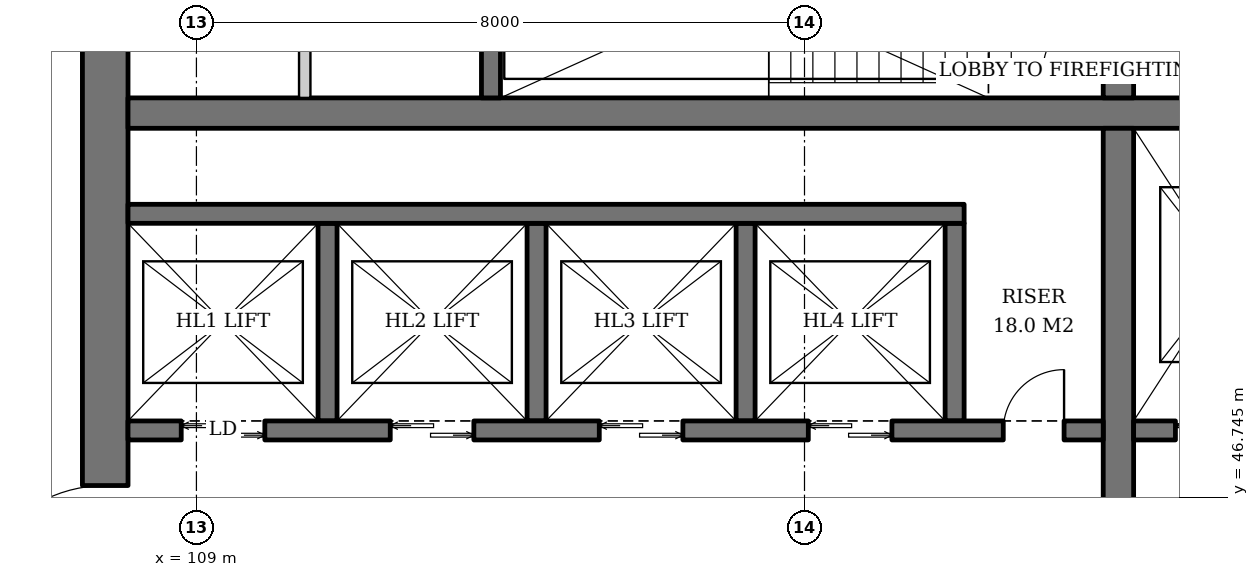
"""IFC4 building model, lengths in metres.
Left out: names, types, materials, properties, quantities, classifications, styles, units other than length and angle.
Written with IfcOpenShell. Run it as: python <this file> out.ifc"""

import sys

from ifc_helpers import new_model, si_unit, direction, frame, frame_2d, origin, place, context, subcontext, project, spatial, rectangle, extrude, element, fill, save


model = new_model("IFC4")
c1 = context("Model", 3, precision=1e-05, world=origin(), true_north=direction((0.0, 1.0)))
c2 = subcontext(c1, "Body", "Model", "MODEL_VIEW")
j1 = project(units=[si_unit("LENGTHUNIT", "METRE"), si_unit("PLANEANGLEUNIT", "RADIAN")], contexts=[c1])
p1 = place(None, origin())
s1 = spatial("IfcSite", under=j1, at=p1, CompositionType="ELEMENT")
p2 = place(p1, origin())
s2 = spatial("IfcBuilding", under=s1, at=p2, CompositionType="ELEMENT")
p3 = place(p2, frame((0.0, 0.0, 100.8)))
s3 = spatial("IfcBuildingStorey", under=s2, at=p3, CompositionType="ELEMENT", Elevation=100.8)
p4 = place(p3, frame((107.8, 37.1, 0.0), z_axis=(0.0, 0.0, 1.0), x_axis=(0.0, 1.0, 0.0)))
e1 = element("IfcWall", 1, at=p4, inside=s3, PredefinedType="SHEAR", context=c2, shape_type="SweptSolid", body=[
    extrude(rectangle(XDim=17.8, YDim=0.6, at=frame_2d((8.9, 0.0))), origin(), (0.0, 0.0, 1.0), 3.8),
])
p5 = place(p4, frame((8.0, 0.0, 0.0)))
e2 = element("IfcOpeningElement", 2, at=p5, cuts=e1, PredefinedType="OPENING", context=c2, shape_type="SweptSolid", body=[
    extrude(rectangle(XDim=1.8, YDim=2.4, at=frame_2d((0.9, 1.2))), frame((0.0, 0.31, 0.0), z_axis=(0.0, -1.0, 0.0), x_axis=(1.0, 0.0, 0.0)), (0.0, 0.0, 1.0), 0.62),
])
p6 = place(p3, frame((108.1, 51.8, 0.0), z_axis=(0.0, 0.0, 1.0), x_axis=(1.0, 0.0, 0.0)))
e3 = element("IfcWall", 3, at=p6, inside=s3, PredefinedType="SHEAR", context=c2, shape_type="SweptSolid", body=[
    extrude(rectangle(XDim=17.8, YDim=0.4, at=frame_2d((8.9, 0.0))), origin(), (0.0, 0.0, 1.0), 3.8),
])
p7 = place(p3, frame((121.13, 40.4, 0.0), z_axis=(0.0, 0.0, 1.0), x_axis=(0.0, 1.0, 0.0)))
e4 = element("IfcWall", 4, at=p7, inside=s3, PredefinedType="SHEAR", context=c2, shape_type="SweptSolid", body=[
    extrude(rectangle(XDim=11.2, YDim=0.4, at=frame_2d((5.6, 0.0))), origin(), (0.0, 0.0, 1.0), 3.8),
])
p8 = place(p3, frame((121.13, 52.0, 0.0), z_axis=(0.0, 0.0, 1.0), x_axis=(0.0, 1.0, 0.0)))
e5 = element("IfcWall", 5, at=p8, inside=s3, PredefinedType="SHEAR", context=c2, shape_type="SweptSolid", body=[
    extrude(rectangle(XDim=2.9, YDim=0.4, at=frame_2d((1.45, 0.0))), origin(), (0.0, 0.0, 1.0), 3.8),
])
p9 = place(p8, frame((0.3, 0.0, 0.0)))
e6 = element("IfcOpeningElement", 6, at=p9, cuts=e5, PredefinedType="OPENING", context=c2, shape_type="SweptSolid", body=[
    extrude(rectangle(XDim=1.0, YDim=2.1, at=frame_2d((0.5, 1.05))), frame((0.0, 0.21, 0.0), z_axis=(0.0, -1.0, 0.0), x_axis=(1.0, 0.0, 0.0)), (0.0, 0.0, 1.0), 0.42),
])
p10 = place(p3, frame((112.875, 52.0, 0.0), z_axis=(0.0, 0.0, 1.0), x_axis=(0.0, 1.0, 0.0)))
e7 = element("IfcWall", 7, at=p10, inside=s3, PredefinedType="SHEAR", context=c2, shape_type="SweptSolid", body=[
    extrude(rectangle(XDim=2.9, YDim=0.25, at=frame_2d((1.45, 0.0))), origin(), (0.0, 0.0, 1.0), 3.8),
])
for number, where, z_axis, x_axis in (
    (8, (110.725, 47.75, 0.0), (0.0, 0.0, 1.0), (0.0, 1.0, 0.0)),
    (9, (113.475, 47.75, 0.0), (0.0, 0.0, 1.0), (0.0, 1.0, 0.0)),
    (10, (116.225, 47.75, 0.0), (0.0, 0.0, 1.0), (0.0, 1.0, 0.0)),
    (11, (118.975, 47.75, 0.0), (0.0, 0.0, 1.0), (0.0, 1.0, 0.0)),
):
    element("IfcWall", number, at=place(p3, frame(where, z_axis=z_axis, x_axis=x_axis)), inside=s3, PredefinedType="SHEAR", context=c2, shape_type="SweptSolid", body=[
        extrude(rectangle(XDim=2.6, YDim=0.25, at=frame_2d((1.3, 0.0))), origin(), (0.0, 0.0, 1.0), 3.8),
    ])
p11 = place(p3, frame((108.1, 50.475, 0.0), z_axis=(0.0, 0.0, 1.0), x_axis=(1.0, 0.0, 0.0)))
e12 = element("IfcWall", 12, at=p11, inside=s3, PredefinedType="SHEAR", context=c2, shape_type="SweptSolid", body=[
    extrude(rectangle(XDim=11.0, YDim=0.25, at=frame_2d((5.5, 0.0))), origin(), (0.0, 0.0, 1.0), 3.8),
])
p12 = place(p3, frame((108.1, 47.625, 0.0), z_axis=(0.0, 0.0, 1.0), x_axis=(1.0, 0.0, 0.0)))
e13 = element("IfcWall", 13, at=p12, inside=s3, PredefinedType="SHEAR", context=c2, shape_type="SweptSolid", body=[
    extrude(rectangle(XDim=12.83, YDim=0.25, at=frame_2d((6.415, 0.0))), origin(), (0.0, 0.0, 1.0), 3.8),
])
p13 = place(p12, frame((0.7, 0.0, 0.0)))
e14 = element("IfcOpeningElement", 14, at=p13, cuts=e13, PredefinedType="OPENING", context=c2, shape_type="SweptSolid", body=[
    extrude(rectangle(XDim=1.1, YDim=2.2, at=frame_2d((0.55, 1.1))), frame((0.0, 0.135, 0.0), z_axis=(0.0, -1.0, 0.0), x_axis=(1.0, 0.0, 0.0)), (0.0, 0.0, 1.0), 0.27),
])
p14 = place(p12, frame((3.45, 0.0, 0.0)))
e15 = element("IfcOpeningElement", 15, at=p14, cuts=e13, PredefinedType="OPENING", context=c2, shape_type="SweptSolid", body=[
    extrude(rectangle(XDim=1.1, YDim=2.2, at=frame_2d((0.55, 1.1))), frame((0.0, 0.135, 0.0), z_axis=(0.0, -1.0, 0.0), x_axis=(1.0, 0.0, 0.0)), (0.0, 0.0, 1.0), 0.27),
])
p15 = place(p12, frame((6.2, 0.0, 0.0)))
e16 = element("IfcOpeningElement", 16, at=p15, cuts=e13, PredefinedType="OPENING", context=c2, shape_type="SweptSolid", body=[
    extrude(rectangle(XDim=1.1, YDim=2.2, at=frame_2d((0.55, 1.1))), frame((0.0, 0.135, 0.0), z_axis=(0.0, -1.0, 0.0), x_axis=(1.0, 0.0, 0.0)), (0.0, 0.0, 1.0), 0.27),
])
p16 = place(p12, frame((8.95, 0.0, 0.0)))
e17 = element("IfcOpeningElement", 17, at=p16, cuts=e13, PredefinedType="OPENING", context=c2, shape_type="SweptSolid", body=[
    extrude(rectangle(XDim=1.1, YDim=2.2, at=frame_2d((0.55, 1.1))), frame((0.0, 0.135, 0.0), z_axis=(0.0, -1.0, 0.0), x_axis=(1.0, 0.0, 0.0)), (0.0, 0.0, 1.0), 0.27),
])
p17 = place(p12, frame((11.515, 0.0, 0.0)))
e18 = element("IfcOpeningElement", 18, at=p17, cuts=e13, PredefinedType="OPENING", context=c2, shape_type="SweptSolid", body=[
    extrude(rectangle(XDim=0.8, YDim=2.0, at=frame_2d((0.4, 1.0))), frame((0.0, 0.135, 0.0), z_axis=(0.0, -1.0, 0.0), x_axis=(1.0, 0.0, 0.0)), (0.0, 0.0, 1.0), 0.27),
])
p18 = place(p3, frame((121.33, 47.625, 0.0), z_axis=(0.0, 0.0, 1.0), x_axis=(1.0, 0.0, 0.0)))
e19 = element("IfcWall", 19, at=p18, inside=s3, PredefinedType="SHEAR", context=c2, shape_type="SweptSolid", body=[
    extrude(rectangle(XDim=4.57, YDim=0.25, at=frame_2d((2.285, 0.0))), origin(), (0.0, 0.0, 1.0), 3.8),
])
p19 = place(p18, frame((0.55, 0.0, 0.0)))
e20 = element("IfcOpeningElement", 20, at=p19, cuts=e19, PredefinedType="OPENING", context=c2, shape_type="SweptSolid", body=[
    extrude(rectangle(XDim=1.4, YDim=2.4, at=frame_2d((0.7, 1.2))), frame((0.0, 0.135, 0.0), z_axis=(0.0, -1.0, 0.0), x_axis=(1.0, 0.0, 0.0)), (0.0, 0.0, 1.0), 0.27),
])
p20 = place(p18, frame((3.26, 0.0, 0.0)))
e21 = element("IfcOpeningElement", 21, at=p20, cuts=e19, PredefinedType="OPENING", context=c2, shape_type="SweptSolid", body=[
    extrude(rectangle(XDim=0.8, YDim=2.0, at=frame_2d((0.4, 1.0))), frame((0.0, 0.135, 0.0), z_axis=(0.0, -1.0, 0.0), x_axis=(1.0, 0.0, 0.0)), (0.0, 0.0, 1.0), 0.27),
])
p21 = place(p3, frame((110.425, 52.0, 0.0), z_axis=(0.0, 0.0, 1.0), x_axis=(0.0, 1.0, 0.0)))
e22 = element("IfcWall", 22, at=p21, inside=s3, PredefinedType="SOLIDWALL", context=c2, shape_type="SweptSolid", body=[
    extrude(rectangle(XDim=2.9, YDim=0.15, at=frame_2d((1.45, 0.0))), origin(), (0.0, 0.0, 1.0), 3.6),
])
p22 = place(p13, origin())
e23 = element("IfcDoor", 23, at=p22, inside=s3, OperationType="DOUBLE_DOOR_SLIDING", PredefinedType="DOOR", context=c2, shape_type="SweptSolid", body=[
    extrude(rectangle(XDim=1.1, YDim=2.2, at=frame_2d((0.55, 1.1))), frame((0.0, 0.025, 0.0), z_axis=(0.0, -1.0, 0.0), x_axis=(1.0, 0.0, 0.0)), (0.0, 0.0, 1.0), 0.05),
])
fill(e14, e23)
p23 = place(p14, origin())
e24 = element("IfcDoor", 24, at=p23, inside=s3, OperationType="DOUBLE_DOOR_SLIDING", PredefinedType="DOOR", context=c2, shape_type="SweptSolid", body=[
    extrude(rectangle(XDim=1.1, YDim=2.2, at=frame_2d((0.55, 1.1))), frame((0.0, 0.025, 0.0), z_axis=(0.0, -1.0, 0.0), x_axis=(1.0, 0.0, 0.0)), (0.0, 0.0, 1.0), 0.05),
])
fill(e15, e24)
p24 = place(p15, origin())
e25 = element("IfcDoor", 25, at=p24, inside=s3, OperationType="DOUBLE_DOOR_SLIDING", PredefinedType="DOOR", context=c2, shape_type="SweptSolid", body=[
    extrude(rectangle(XDim=1.1, YDim=2.2, at=frame_2d((0.55, 1.1))), frame((0.0, 0.025, 0.0), z_axis=(0.0, -1.0, 0.0), x_axis=(1.0, 0.0, 0.0)), (0.0, 0.0, 1.0), 0.05),
])
fill(e16, e25)
p25 = place(p16, origin())
e26 = element("IfcDoor", 26, at=p25, inside=s3, OperationType="DOUBLE_DOOR_SLIDING", PredefinedType="DOOR", context=c2, shape_type="SweptSolid", body=[
    extrude(rectangle(XDim=1.1, YDim=2.2, at=frame_2d((0.55, 1.1))), frame((0.0, 0.025, 0.0), z_axis=(0.0, -1.0, 0.0), x_axis=(1.0, 0.0, 0.0)), (0.0, 0.0, 1.0), 0.05),
])
fill(e17, e26)
p26 = place(p17, origin())
e27 = element("IfcDoor", 27, at=p26, inside=s3, OperationType="SINGLE_SWING_RIGHT", PredefinedType="DOOR", context=c2, shape_type="SweptSolid", body=[
    extrude(rectangle(XDim=0.8, YDim=2.0, at=frame_2d((0.4, 1.0))), frame((0.0, 0.025, 0.0), z_axis=(0.0, -1.0, 0.0), x_axis=(1.0, 0.0, 0.0)), (0.0, 0.0, 1.0), 0.05),
])
fill(e18, e27)
p27 = place(p19, origin())
e28 = element("IfcDoor", 28, at=p27, inside=s3, OperationType="DOUBLE_DOOR_SLIDING", PredefinedType="DOOR", context=c2, shape_type="SweptSolid", body=[
    extrude(rectangle(XDim=1.4, YDim=2.4, at=frame_2d((0.7, 1.2))), frame((0.0, 0.025, 0.0), z_axis=(0.0, -1.0, 0.0), x_axis=(1.0, 0.0, 0.0)), (0.0, 0.0, 1.0), 0.05),
])
fill(e20, e28)
p28 = place(p9, origin())
e29 = element("IfcDoor", 29, at=p28, inside=s3, OperationType="SINGLE_SWING_LEFT", PredefinedType="DOOR", context=c2, shape_type="SweptSolid", body=[
    extrude(rectangle(XDim=1.0, YDim=2.1, at=frame_2d((0.5, 1.05))), frame((0.0, 0.025, 0.0), z_axis=(0.0, -1.0, 0.0), x_axis=(1.0, 0.0, 0.0)), (0.0, 0.0, 1.0), 0.05),
])
fill(e6, e29)
p29 = place(p5, origin())
e30 = element("IfcDoor", 30, at=p29, inside=s3, OperationType="DOUBLE_DOOR_SINGLE_SWING", PredefinedType="DOOR", context=c2, shape_type="SweptSolid", body=[
    extrude(rectangle(XDim=1.8, YDim=2.4, at=frame_2d((0.9, 1.2))), frame((0.0, 0.025, 0.0), z_axis=(0.0, -1.0, 0.0), x_axis=(1.0, 0.0, 0.0)), (0.0, 0.0, 1.0), 0.05),
])
fill(e2, e30)
save(model, sys.argv[1])
